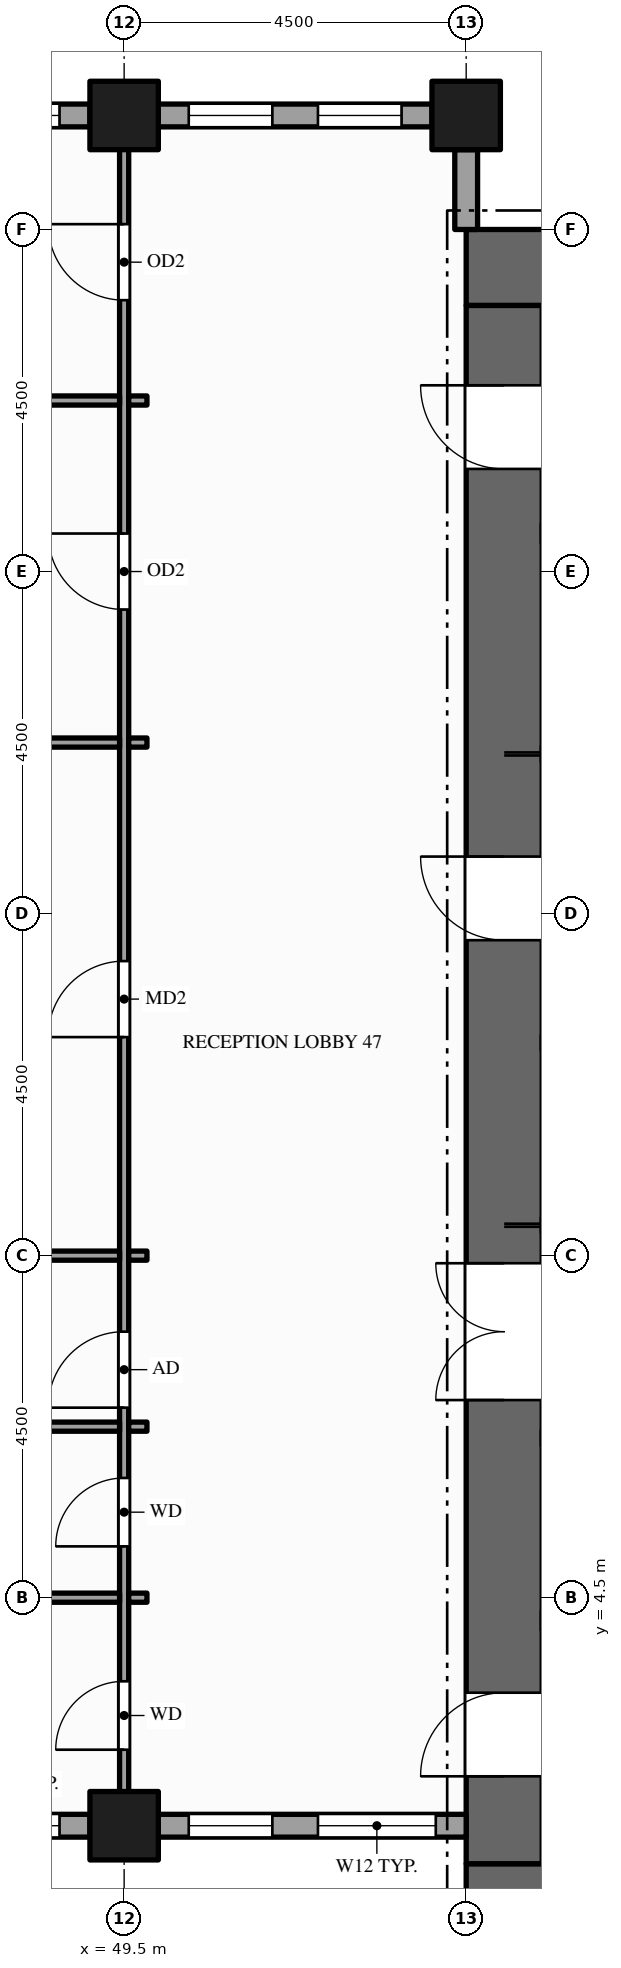
"""IFC4 building model, lengths in metres.
Left out: names, types, materials, properties, quantities, classifications, styles, units other than length and angle.
Written with IfcOpenShell. Run it as: python <this file> out.ifc"""

import sys

from ifc_helpers import new_model, si_unit, direction, frame, frame_2d, origin, origin_2d, place, context, subcontext, project, spatial, rectangle, hollow_rectangle, extrude, element, fill, save


model = new_model("IFC4")
c1 = context("Model", 3, precision=1e-05, world=origin(), true_north=direction((0.0, 1.0)))
c2 = subcontext(c1, "Body", "Model", "MODEL_VIEW")
j1 = project(units=[si_unit("LENGTHUNIT", "METRE"), si_unit("PLANEANGLEUNIT", "RADIAN")], contexts=[c1])
p1 = place(None, origin())
s1 = spatial("IfcSite", under=j1, at=p1, CompositionType="ELEMENT")
p2 = place(p1, origin())
s2 = spatial("IfcBuilding", under=s1, at=p2, CompositionType="ELEMENT")
p3 = place(p2, frame((0.0, 0.0, 143.0)))
s3 = spatial("IfcBuildingStorey", under=s2, at=p3, CompositionType="ELEMENT", Elevation=143.0)
for number, where, z_axis, x_axis in (
    (1, (67.5, 0.5, -0.15), (0.0, 0.0, 1.0), (-1.0, 0.0, 0.0)),
    (2, (54.0, 22.0, -0.15), (0.0, 0.0, 1.0), (1.0, 0.0, 0.0)),
):
    element("IfcWall", number, at=place(p3, frame(where, z_axis=z_axis, x_axis=x_axis)), inside=s3, PredefinedType="SHEAR", context=c2, shape_type="SweptSolid", body=[
        extrude(rectangle(XDim=13.5, YDim=1.0, at=frame_2d((6.75, 0.0))), origin(), (0.0, 0.0, 1.0), 4.0),
    ])
p4 = place(p3, frame((54.5, 1.0, -0.15), z_axis=(0.0, 0.0, 1.0), x_axis=(0.0, 1.0, 0.0)))
e3 = element("IfcWall", 3, at=p4, inside=s3, PredefinedType="SHEAR", context=c2, shape_type="SweptSolid", body=[
    extrude(rectangle(XDim=20.5, YDim=1.0, at=frame_2d((10.25, 0.0))), origin(), (0.0, 0.0, 1.0), 4.0),
])
p5 = place(p4, frame((6.1, 0.0, 0.15)))
e4 = element("IfcOpeningElement", 4, at=p5, cuts=e3, PredefinedType="OPENING", context=c2, shape_type="SweptSolid", body=[
    extrude(rectangle(XDim=1.8, YDim=2.1, at=frame_2d((0.9, 1.05))), frame((0.0, 0.51, 0.0), z_axis=(0.0, -1.0, 0.0), x_axis=(1.0, 0.0, 0.0)), (0.0, 0.0, 1.0), 1.02),
])
p6 = place(p4, frame((12.15, 0.0, 0.15)))
e5 = element("IfcOpeningElement", 5, at=p6, cuts=e3, PredefinedType="OPENING", context=c2, shape_type="SweptSolid", body=[
    extrude(rectangle(XDim=1.1, YDim=2.1, at=frame_2d((0.55, 1.05))), frame((0.0, 0.51, 0.0), z_axis=(0.0, -1.0, 0.0), x_axis=(1.0, 0.0, 0.0)), (0.0, 0.0, 1.0), 1.02),
])
p7 = place(p4, frame((1.15, 0.0, 0.15)))
e6 = element("IfcOpeningElement", 6, at=p7, cuts=e3, PredefinedType="OPENING", context=c2, shape_type="SweptSolid", body=[
    extrude(rectangle(XDim=1.1, YDim=2.1, at=frame_2d((0.55, 1.05))), frame((0.0, 0.51, 0.0), z_axis=(0.0, -1.0, 0.0), x_axis=(1.0, 0.0, 0.0)), (0.0, 0.0, 1.0), 1.02),
])
p8 = place(p4, frame((18.35, 0.0, 0.15)))
e7 = element("IfcOpeningElement", 7, at=p8, cuts=e3, PredefinedType="OPENING", context=c2, shape_type="SweptSolid", body=[
    extrude(rectangle(XDim=1.1, YDim=2.1, at=frame_2d((0.55, 1.05))), frame((0.0, 0.51, 0.0), z_axis=(0.0, -1.0, 0.0), x_axis=(1.0, 0.0, 0.0)), (0.0, 0.0, 1.0), 1.02),
])
for number, where, z_axis, x_axis in (
    (8, (49.5, 1.5, -0.15), (0.0, 0.0, 1.0), (1.0, 0.0, 0.0)),
    (9, (49.5, 24.0, -0.15), (0.0, 0.0, 1.0), (1.0, 0.0, 0.0)),
    (10, (54.0, 24.0, -0.15), (0.0, 0.0, 1.0), (1.0, 0.0, 0.0)),
):
    element("IfcColumn", number, at=place(p3, frame(where, z_axis=z_axis, x_axis=x_axis)), inside=s3, PredefinedType="COLUMN", context=c2, shape_type="SweptSolid", body=[
        extrude(hollow_rectangle(XDim=0.9, YDim=0.9, WallThickness=0.045, at=origin_2d()), origin(), (0.0, 0.0, 1.0), 4.0),
    ])
p9 = place(p3, frame((45.45, 1.5, 0.0), z_axis=(0.0, 0.0, 1.0), x_axis=(1.0, 0.0, 0.0)))
e11 = element("IfcWall", 11, at=p9, inside=s3, PredefinedType="STANDARD", context=c2, shape_type="SweptSolid", body=[
    extrude(rectangle(XDim=3.6, YDim=0.3, at=frame_2d((1.8, 0.0))), origin(), (0.0, 0.0, 1.0), 2.87),
])
p10 = place(p9, frame((0.4, 0.0, 0.9)))
e12 = element("IfcOpeningElement", 12, at=p10, cuts=e11, PredefinedType="OPENING", context=c2, shape_type="SweptSolid", body=[
    extrude(rectangle(XDim=1.1, YDim=1.75, at=frame_2d((0.55, 0.875))), frame((0.0, 0.16, 0.0), z_axis=(0.0, -1.0, 0.0), x_axis=(1.0, 0.0, 0.0)), (0.0, 0.0, 1.0), 0.32),
])
p11 = place(p9, frame((2.1, 0.0, 0.9)))
e13 = element("IfcOpeningElement", 13, at=p11, cuts=e11, PredefinedType="OPENING", context=c2, shape_type="SweptSolid", body=[
    extrude(rectangle(XDim=1.1, YDim=1.75, at=frame_2d((0.55, 0.875))), frame((0.0, 0.16, 0.0), z_axis=(0.0, -1.0, 0.0), x_axis=(1.0, 0.0, 0.0)), (0.0, 0.0, 1.0), 0.32),
])
p12 = place(p3, frame((49.95, 1.5, 0.0), z_axis=(0.0, 0.0, 1.0), x_axis=(1.0, 0.0, 0.0)))
e14 = element("IfcWall", 14, at=p12, inside=s3, PredefinedType="STANDARD", context=c2, shape_type="SweptSolid", body=[
    extrude(rectangle(XDim=4.05, YDim=0.3, at=frame_2d((2.025, 0.0))), origin(), (0.0, 0.0, 1.0), 2.87),
])
p13 = place(p12, frame((0.4, 0.0, 0.9)))
e15 = element("IfcOpeningElement", 15, at=p13, cuts=e14, PredefinedType="OPENING", context=c2, shape_type="SweptSolid", body=[
    extrude(rectangle(XDim=1.1, YDim=1.75, at=frame_2d((0.55, 0.875))), frame((0.0, 0.16, 0.0), z_axis=(0.0, -1.0, 0.0), x_axis=(1.0, 0.0, 0.0)), (0.0, 0.0, 1.0), 0.32),
])
p14 = place(p12, frame((2.1, 0.0, 0.9)))
e16 = element("IfcOpeningElement", 16, at=p14, cuts=e14, PredefinedType="OPENING", context=c2, shape_type="SweptSolid", body=[
    extrude(rectangle(XDim=1.55, YDim=1.75, at=frame_2d((0.775, 0.875))), frame((0.0, 0.16, 0.0), z_axis=(0.0, -1.0, 0.0), x_axis=(1.0, 0.0, 0.0)), (0.0, 0.0, 1.0), 0.32),
])
p15 = place(p3, frame((54.0, 22.5, 0.0), z_axis=(0.0, 0.0, 1.0), x_axis=(0.0, 1.0, 0.0)))
e17 = element("IfcWall", 17, at=p15, inside=s3, PredefinedType="STANDARD", context=c2, shape_type="SweptSolid", body=[
    extrude(rectangle(XDim=1.05, YDim=0.3, at=frame_2d((0.525, 0.0))), origin(), (0.0, 0.0, 1.0), 3.149),
])
p16 = place(p3, frame((53.55, 24.0, 0.0), z_axis=(0.0, 0.0, 1.0), x_axis=(-1.0, 0.0, 0.0)))
e18 = element("IfcWall", 18, at=p16, inside=s3, PredefinedType="STANDARD", context=c2, shape_type="SweptSolid", body=[
    extrude(rectangle(XDim=3.6, YDim=0.3, at=frame_2d((1.8, 0.0))), origin(), (0.0, 0.0, 1.0), 2.87),
])
p17 = place(p16, frame((0.4, 0.0, 0.9)))
e19 = element("IfcOpeningElement", 19, at=p17, cuts=e18, PredefinedType="OPENING", context=c2, shape_type="SweptSolid", body=[
    extrude(rectangle(XDim=1.1, YDim=1.75, at=frame_2d((0.55, 0.875))), frame((0.0, 0.16, 0.0), z_axis=(0.0, -1.0, 0.0), x_axis=(1.0, 0.0, 0.0)), (0.0, 0.0, 1.0), 0.32),
])
p18 = place(p16, frame((2.1, 0.0, 0.9)))
e20 = element("IfcOpeningElement", 20, at=p18, cuts=e18, PredefinedType="OPENING", context=c2, shape_type="SweptSolid", body=[
    extrude(rectangle(XDim=1.1, YDim=1.75, at=frame_2d((0.55, 0.875))), frame((0.0, 0.16, 0.0), z_axis=(0.0, -1.0, 0.0), x_axis=(1.0, 0.0, 0.0)), (0.0, 0.0, 1.0), 0.32),
])
p19 = place(p3, frame((49.05, 24.0, 0.0), z_axis=(0.0, 0.0, 1.0), x_axis=(-1.0, 0.0, 0.0)))
e21 = element("IfcWall", 21, at=p19, inside=s3, PredefinedType="STANDARD", context=c2, shape_type="SweptSolid", body=[
    extrude(rectangle(XDim=3.6, YDim=0.3, at=frame_2d((1.8, 0.0))), origin(), (0.0, 0.0, 1.0), 2.87),
])
p20 = place(p19, frame((0.4, 0.0, 0.9)))
e22 = element("IfcOpeningElement", 22, at=p20, cuts=e21, PredefinedType="OPENING", context=c2, shape_type="SweptSolid", body=[
    extrude(rectangle(XDim=1.1, YDim=1.75, at=frame_2d((0.55, 0.875))), frame((0.0, 0.16, 0.0), z_axis=(0.0, -1.0, 0.0), x_axis=(1.0, 0.0, 0.0)), (0.0, 0.0, 1.0), 0.32),
])
p21 = place(p19, frame((2.1, 0.0, 0.9)))
e23 = element("IfcOpeningElement", 23, at=p21, cuts=e21, PredefinedType="OPENING", context=c2, shape_type="SweptSolid", body=[
    extrude(rectangle(XDim=1.1, YDim=1.75, at=frame_2d((0.55, 0.875))), frame((0.0, 0.16, 0.0), z_axis=(0.0, -1.0, 0.0), x_axis=(1.0, 0.0, 0.0)), (0.0, 0.0, 1.0), 0.32),
])
p22 = place(p3, frame((49.5, 1.65, 0.0), z_axis=(0.0, 0.0, 1.0), x_axis=(0.0, 1.0, 0.0)))
e24 = element("IfcWall", 24, at=p22, inside=s3, PredefinedType="PARTITIONING", context=c2, shape_type="SweptSolid", body=[
    extrude(rectangle(XDim=22.2, YDim=0.12, at=frame_2d((11.1, 0.0))), origin(), (0.0, 0.0, 1.0), 2.87),
])
p23 = place(p22, frame((0.85, 0.0, 0.0)))
e25 = element("IfcOpeningElement", 25, at=p23, cuts=e24, PredefinedType="OPENING", context=c2, shape_type="SweptSolid", body=[
    extrude(rectangle(XDim=0.9, YDim=2.1, at=frame_2d((0.45, 1.05))), frame((0.0, 0.07, 0.0), z_axis=(0.0, -1.0, 0.0), x_axis=(1.0, 0.0, 0.0)), (0.0, 0.0, 1.0), 0.14),
])
p24 = place(p22, frame((3.525, 0.0, 0.0)))
e26 = element("IfcOpeningElement", 26, at=p24, cuts=e24, PredefinedType="OPENING", context=c2, shape_type="SweptSolid", body=[
    extrude(rectangle(XDim=0.9, YDim=2.1, at=frame_2d((0.45, 1.05))), frame((0.0, 0.07, 0.0), z_axis=(0.0, -1.0, 0.0), x_axis=(1.0, 0.0, 0.0)), (0.0, 0.0, 1.0), 0.14),
])
p25 = place(p22, frame((5.35, 0.0, 0.0)))
e27 = element("IfcOpeningElement", 27, at=p25, cuts=e24, PredefinedType="OPENING", context=c2, shape_type="SweptSolid", body=[
    extrude(rectangle(XDim=1.0, YDim=2.1, at=frame_2d((0.5, 1.05))), frame((0.0, 0.07, 0.0), z_axis=(0.0, -1.0, 0.0), x_axis=(1.0, 0.0, 0.0)), (0.0, 0.0, 1.0), 0.14),
])
p26 = place(p22, frame((10.225, 0.0, 0.0)))
e28 = element("IfcOpeningElement", 28, at=p26, cuts=e24, PredefinedType="OPENING", context=c2, shape_type="SweptSolid", body=[
    extrude(rectangle(XDim=1.0, YDim=2.1, at=frame_2d((0.5, 1.05))), frame((0.0, 0.07, 0.0), z_axis=(0.0, -1.0, 0.0), x_axis=(1.0, 0.0, 0.0)), (0.0, 0.0, 1.0), 0.14),
])
p27 = place(p22, frame((15.85, 0.0, 0.0)))
e29 = element("IfcOpeningElement", 29, at=p27, cuts=e24, PredefinedType="OPENING", context=c2, shape_type="SweptSolid", body=[
    extrude(rectangle(XDim=1.0, YDim=2.1, at=frame_2d((0.5, 1.05))), frame((0.0, 0.07, 0.0), z_axis=(0.0, -1.0, 0.0), x_axis=(1.0, 0.0, 0.0)), (0.0, 0.0, 1.0), 0.14),
])
p28 = place(p22, frame((19.92, 0.0, 0.0)))
e30 = element("IfcOpeningElement", 30, at=p28, cuts=e24, PredefinedType="OPENING", context=c2, shape_type="SweptSolid", body=[
    extrude(rectangle(XDim=1.0, YDim=2.1, at=frame_2d((0.5, 1.05))), frame((0.0, 0.07, 0.0), z_axis=(0.0, -1.0, 0.0), x_axis=(1.0, 0.0, 0.0)), (0.0, 0.0, 1.0), 0.14),
])
p29 = place(p3, frame((45.15, 4.5, 0.0), z_axis=(0.0, 0.0, 1.0), x_axis=(1.0, 0.0, 0.0)))
e31 = element("IfcWall", 31, at=p29, inside=s3, PredefinedType="PARTITIONING", context=c2, shape_type="SweptSolid", body=[
    extrude(rectangle(XDim=4.29, YDim=0.12, at=frame_2d((2.145, 0.0))), origin(), (0.0, 0.0, 1.0), 2.87),
])
p30 = place(p3, frame((49.56, 4.5, 0.0), z_axis=(0.0, 0.0, 1.0), x_axis=(1.0, 0.0, 0.0)))
e32 = element("IfcWall", 32, at=p30, inside=s3, PredefinedType="PARTITIONING", context=c2, shape_type="SweptSolid", body=[
    extrude(rectangle(XDim=0.24, YDim=0.12, at=frame_2d((0.12, 0.0))), origin(), (0.0, 0.0, 1.0), 2.87),
])
p31 = place(p3, frame((45.15, 6.75, 0.0), z_axis=(0.0, 0.0, 1.0), x_axis=(1.0, 0.0, 0.0)))
e33 = element("IfcWall", 33, at=p31, inside=s3, PredefinedType="PARTITIONING", context=c2, shape_type="SweptSolid", body=[
    extrude(rectangle(XDim=4.29, YDim=0.12, at=frame_2d((2.145, 0.0))), origin(), (0.0, 0.0, 1.0), 2.87),
])
p32 = place(p3, frame((49.56, 6.75, 0.0), z_axis=(0.0, 0.0, 1.0), x_axis=(1.0, 0.0, 0.0)))
e34 = element("IfcWall", 34, at=p32, inside=s3, PredefinedType="PARTITIONING", context=c2, shape_type="SweptSolid", body=[
    extrude(rectangle(XDim=0.24, YDim=0.12, at=frame_2d((0.12, 0.0))), origin(), (0.0, 0.0, 1.0), 2.87),
])
p33 = place(p3, frame((45.15, 9.0, 0.0), z_axis=(0.0, 0.0, 1.0), x_axis=(1.0, 0.0, 0.0)))
e35 = element("IfcWall", 35, at=p33, inside=s3, PredefinedType="PARTITIONING", context=c2, shape_type="SweptSolid", body=[
    extrude(rectangle(XDim=4.29, YDim=0.12, at=frame_2d((2.145, 0.0))), origin(), (0.0, 0.0, 1.0), 2.87),
])
p34 = place(p3, frame((49.56, 9.0, 0.0), z_axis=(0.0, 0.0, 1.0), x_axis=(1.0, 0.0, 0.0)))
e36 = element("IfcWall", 36, at=p34, inside=s3, PredefinedType="PARTITIONING", context=c2, shape_type="SweptSolid", body=[
    extrude(rectangle(XDim=0.24, YDim=0.12, at=frame_2d((0.12, 0.0))), origin(), (0.0, 0.0, 1.0), 2.87),
])
p35 = place(p3, frame((55.0, 9.4, 0.0), z_axis=(0.0, 0.0, 1.0), x_axis=(1.0, 0.0, 0.0)))
e37 = element("IfcWall", 37, at=p35, inside=s3, PredefinedType="SOLIDWALL", context=c2, shape_type="SweptSolid", body=[
    extrude(rectangle(XDim=2.3, YDim=0.2, at=frame_2d((1.15, 0.0))), origin(), (0.0, 0.0, 1.0), 3.85),
])
p36 = place(p35, frame((0.6, 0.0, 0.012)))
e38 = element("IfcOpeningElement", 38, at=p36, cuts=e37, PredefinedType="OPENING", context=c2, shape_type="SweptSolid", body=[
    extrude(rectangle(XDim=1.1, YDim=2.1, at=frame_2d((0.55, 1.05))), frame((0.0, 0.11, 0.0), z_axis=(0.0, -1.0, 0.0), x_axis=(1.0, 0.0, 0.0)), (0.0, 0.0, 1.0), 0.22),
])
p37 = place(p3, frame((55.0, 11.8, 0.0), z_axis=(0.0, 0.0, 1.0), x_axis=(1.0, 0.0, 0.0)))
e39 = element("IfcWall", 39, at=p37, inside=s3, PredefinedType="SOLIDWALL", context=c2, shape_type="SweptSolid", body=[
    extrude(rectangle(XDim=2.3, YDim=0.2, at=frame_2d((1.15, 0.0))), origin(), (0.0, 0.0, 1.0), 3.85),
])
p38 = place(p3, frame((55.0, 15.6, 0.0), z_axis=(0.0, 0.0, 1.0), x_axis=(1.0, 0.0, 0.0)))
e40 = element("IfcWall", 40, at=p38, inside=s3, PredefinedType="SOLIDWALL", context=c2, shape_type="SweptSolid", body=[
    extrude(rectangle(XDim=2.3, YDim=0.2, at=frame_2d((1.15, 0.0))), origin(), (0.0, 0.0, 1.0), 3.85),
])
p39 = place(p38, frame((0.6, 0.0, 0.012)))
e41 = element("IfcOpeningElement", 41, at=p39, cuts=e40, PredefinedType="OPENING", context=c2, shape_type="SweptSolid", body=[
    extrude(rectangle(XDim=1.1, YDim=2.1, at=frame_2d((0.55, 1.05))), frame((0.0, 0.11, 0.0), z_axis=(0.0, -1.0, 0.0), x_axis=(1.0, 0.0, 0.0)), (0.0, 0.0, 1.0), 0.22),
])
p40 = place(p3, frame((45.15, 15.75, 0.0), z_axis=(0.0, 0.0, 1.0), x_axis=(1.0, 0.0, 0.0)))
e42 = element("IfcWall", 42, at=p40, inside=s3, PredefinedType="PARTITIONING", context=c2, shape_type="SweptSolid", body=[
    extrude(rectangle(XDim=4.29, YDim=0.12, at=frame_2d((2.145, 0.0))), origin(), (0.0, 0.0, 1.0), 2.87),
])
p41 = place(p3, frame((49.56, 15.75, 0.0), z_axis=(0.0, 0.0, 1.0), x_axis=(1.0, 0.0, 0.0)))
e43 = element("IfcWall", 43, at=p41, inside=s3, PredefinedType="PARTITIONING", context=c2, shape_type="SweptSolid", body=[
    extrude(rectangle(XDim=0.24, YDim=0.12, at=frame_2d((0.12, 0.0))), origin(), (0.0, 0.0, 1.0), 2.87),
])
p42 = place(p3, frame((45.15, 20.25, 0.0), z_axis=(0.0, 0.0, 1.0), x_axis=(1.0, 0.0, 0.0)))
e44 = element("IfcWall", 44, at=p42, inside=s3, PredefinedType="PARTITIONING", context=c2, shape_type="SweptSolid", body=[
    extrude(rectangle(XDim=4.29, YDim=0.12, at=frame_2d((2.145, 0.0))), origin(), (0.0, 0.0, 1.0), 2.87),
])
p43 = place(p3, frame((49.56, 20.25, 0.0), z_axis=(0.0, 0.0, 1.0), x_axis=(1.0, 0.0, 0.0)))
e45 = element("IfcWall", 45, at=p43, inside=s3, PredefinedType="PARTITIONING", context=c2, shape_type="SweptSolid", body=[
    extrude(rectangle(XDim=0.24, YDim=0.12, at=frame_2d((0.12, 0.0))), origin(), (0.0, 0.0, 1.0), 2.87),
])
p44 = place(p11, origin())
e46 = element("IfcWindow", 46, at=p44, inside=s3, PartitioningType="SINGLE_PANEL", PredefinedType="WINDOW", context=c2, shape_type="SweptSolid", body=[
    extrude(rectangle(XDim=1.1, YDim=1.75, at=frame_2d((0.55, 0.875))), frame((0.0, 0.03, 0.0), z_axis=(0.0, -1.0, 0.0), x_axis=(1.0, 0.0, 0.0)), (0.0, 0.0, 1.0), 0.06),
])
fill(e13, e46)
p45 = place(p13, origin())
e47 = element("IfcWindow", 47, at=p45, inside=s3, PartitioningType="SINGLE_PANEL", PredefinedType="WINDOW", context=c2, shape_type="SweptSolid", body=[
    extrude(rectangle(XDim=1.1, YDim=1.75, at=frame_2d((0.55, 0.875))), frame((0.0, 0.03, 0.0), z_axis=(0.0, -1.0, 0.0), x_axis=(1.0, 0.0, 0.0)), (0.0, 0.0, 1.0), 0.06),
])
fill(e15, e47)
p46 = place(p14, origin())
e48 = element("IfcWindow", 48, at=p46, inside=s3, PartitioningType="SINGLE_PANEL", PredefinedType="WINDOW", context=c2, shape_type="SweptSolid", body=[
    extrude(rectangle(XDim=1.55, YDim=1.75, at=frame_2d((0.775, 0.875))), frame((0.0, 0.03, 0.0), z_axis=(0.0, -1.0, 0.0), x_axis=(1.0, 0.0, 0.0)), (0.0, 0.0, 1.0), 0.06),
])
fill(e16, e48)
p47 = place(p17, origin())
e49 = element("IfcWindow", 49, at=p47, inside=s3, PartitioningType="SINGLE_PANEL", PredefinedType="WINDOW", context=c2, shape_type="SweptSolid", body=[
    extrude(rectangle(XDim=1.1, YDim=1.75, at=frame_2d((0.55, 0.875))), frame((0.0, 0.03, 0.0), z_axis=(0.0, -1.0, 0.0), x_axis=(1.0, 0.0, 0.0)), (0.0, 0.0, 1.0), 0.06),
])
fill(e19, e49)
p48 = place(p18, origin())
e50 = element("IfcWindow", 50, at=p48, inside=s3, PartitioningType="SINGLE_PANEL", PredefinedType="WINDOW", context=c2, shape_type="SweptSolid", body=[
    extrude(rectangle(XDim=1.1, YDim=1.75, at=frame_2d((0.55, 0.875))), frame((0.0, 0.03, 0.0), z_axis=(0.0, -1.0, 0.0), x_axis=(1.0, 0.0, 0.0)), (0.0, 0.0, 1.0), 0.06),
])
fill(e20, e50)
p49 = place(p20, origin())
e51 = element("IfcWindow", 51, at=p49, inside=s3, PartitioningType="SINGLE_PANEL", PredefinedType="WINDOW", context=c2, shape_type="SweptSolid", body=[
    extrude(rectangle(XDim=1.1, YDim=1.75, at=frame_2d((0.55, 0.875))), frame((0.0, 0.03, 0.0), z_axis=(0.0, -1.0, 0.0), x_axis=(1.0, 0.0, 0.0)), (0.0, 0.0, 1.0), 0.06),
])
fill(e22, e51)
p50 = place(p5, origin())
e52 = element("IfcDoor", 52, at=p50, inside=s3, OperationType="DOUBLE_DOOR_SINGLE_SWING", PredefinedType="DOOR", context=c2, shape_type="SweptSolid", body=[
    extrude(rectangle(XDim=1.8, YDim=2.1, at=frame_2d((0.9, 1.05))), frame((0.0, 0.025, 0.0), z_axis=(0.0, -1.0, 0.0), x_axis=(1.0, 0.0, 0.0)), (0.0, 0.0, 1.0), 0.05),
])
fill(e4, e52)
p51 = place(p6, origin())
e53 = element("IfcDoor", 53, at=p51, inside=s3, OperationType="SINGLE_SWING_RIGHT", PredefinedType="DOOR", context=c2, shape_type="SweptSolid", body=[
    extrude(rectangle(XDim=1.1, YDim=2.1, at=frame_2d((0.55, 1.05))), frame((0.0, 0.025, 0.0), z_axis=(0.0, -1.0, 0.0), x_axis=(1.0, 0.0, 0.0)), (0.0, 0.0, 1.0), 0.05),
])
fill(e5, e53)
p52 = place(p7, origin())
e54 = element("IfcDoor", 54, at=p52, inside=s3, OperationType="SINGLE_SWING_LEFT", PredefinedType="DOOR", context=c2, shape_type="SweptSolid", body=[
    extrude(rectangle(XDim=1.1, YDim=2.1, at=frame_2d((0.55, 1.05))), frame((0.0, 0.025, 0.0), z_axis=(0.0, -1.0, 0.0), x_axis=(1.0, 0.0, 0.0)), (0.0, 0.0, 1.0), 0.05),
])
fill(e6, e54)
p53 = place(p8, origin())
e55 = element("IfcDoor", 55, at=p53, inside=s3, OperationType="SINGLE_SWING_RIGHT", PredefinedType="DOOR", context=c2, shape_type="SweptSolid", body=[
    extrude(rectangle(XDim=1.1, YDim=2.1, at=frame_2d((0.55, 1.05))), frame((0.0, 0.025, 0.0), z_axis=(0.0, -1.0, 0.0), x_axis=(1.0, 0.0, 0.0)), (0.0, 0.0, 1.0), 0.05),
])
fill(e7, e55)
p54 = place(p23, origin())
e56 = element("IfcDoor", 56, at=p54, inside=s3, OperationType="SINGLE_SWING_LEFT", PredefinedType="DOOR", context=c2, shape_type="SweptSolid", body=[
    extrude(rectangle(XDim=0.9, YDim=2.1, at=frame_2d((0.45, 1.05))), frame((0.0, 0.025, 0.0), z_axis=(0.0, -1.0, 0.0), x_axis=(1.0, 0.0, 0.0)), (0.0, 0.0, 1.0), 0.05),
])
fill(e25, e56)
p55 = place(p24, origin())
e57 = element("IfcDoor", 57, at=p55, inside=s3, OperationType="SINGLE_SWING_LEFT", PredefinedType="DOOR", context=c2, shape_type="SweptSolid", body=[
    extrude(rectangle(XDim=0.9, YDim=2.1, at=frame_2d((0.45, 1.05))), frame((0.0, 0.025, 0.0), z_axis=(0.0, -1.0, 0.0), x_axis=(1.0, 0.0, 0.0)), (0.0, 0.0, 1.0), 0.05),
])
fill(e26, e57)
p56 = place(p25, origin())
e58 = element("IfcDoor", 58, at=p56, inside=s3, OperationType="SINGLE_SWING_LEFT", PredefinedType="DOOR", context=c2, shape_type="SweptSolid", body=[
    extrude(rectangle(XDim=1.0, YDim=2.1, at=frame_2d((0.5, 1.05))), frame((0.0, 0.025, 0.0), z_axis=(0.0, -1.0, 0.0), x_axis=(1.0, 0.0, 0.0)), (0.0, 0.0, 1.0), 0.05),
])
fill(e27, e58)
p57 = place(p26, origin())
e59 = element("IfcDoor", 59, at=p57, inside=s3, OperationType="SINGLE_SWING_LEFT", PredefinedType="DOOR", context=c2, shape_type="SweptSolid", body=[
    extrude(rectangle(XDim=1.0, YDim=2.1, at=frame_2d((0.5, 1.05))), frame((0.0, 0.025, 0.0), z_axis=(0.0, -1.0, 0.0), x_axis=(1.0, 0.0, 0.0)), (0.0, 0.0, 1.0), 0.05),
])
fill(e28, e59)
p58 = place(p27, origin())
e60 = element("IfcDoor", 60, at=p58, inside=s3, OperationType="SINGLE_SWING_RIGHT", PredefinedType="DOOR", context=c2, shape_type="SweptSolid", body=[
    extrude(rectangle(XDim=1.0, YDim=2.1, at=frame_2d((0.5, 1.05))), frame((0.0, 0.025, 0.0), z_axis=(0.0, -1.0, 0.0), x_axis=(1.0, 0.0, 0.0)), (0.0, 0.0, 1.0), 0.05),
])
fill(e29, e60)
p59 = place(p28, origin())
e61 = element("IfcDoor", 61, at=p59, inside=s3, OperationType="SINGLE_SWING_RIGHT", PredefinedType="DOOR", context=c2, shape_type="SweptSolid", body=[
    extrude(rectangle(XDim=1.0, YDim=2.1, at=frame_2d((0.5, 1.05))), frame((0.0, 0.025, 0.0), z_axis=(0.0, -1.0, 0.0), x_axis=(1.0, 0.0, 0.0)), (0.0, 0.0, 1.0), 0.05),
])
fill(e30, e61)
save(model, sys.argv[1])
